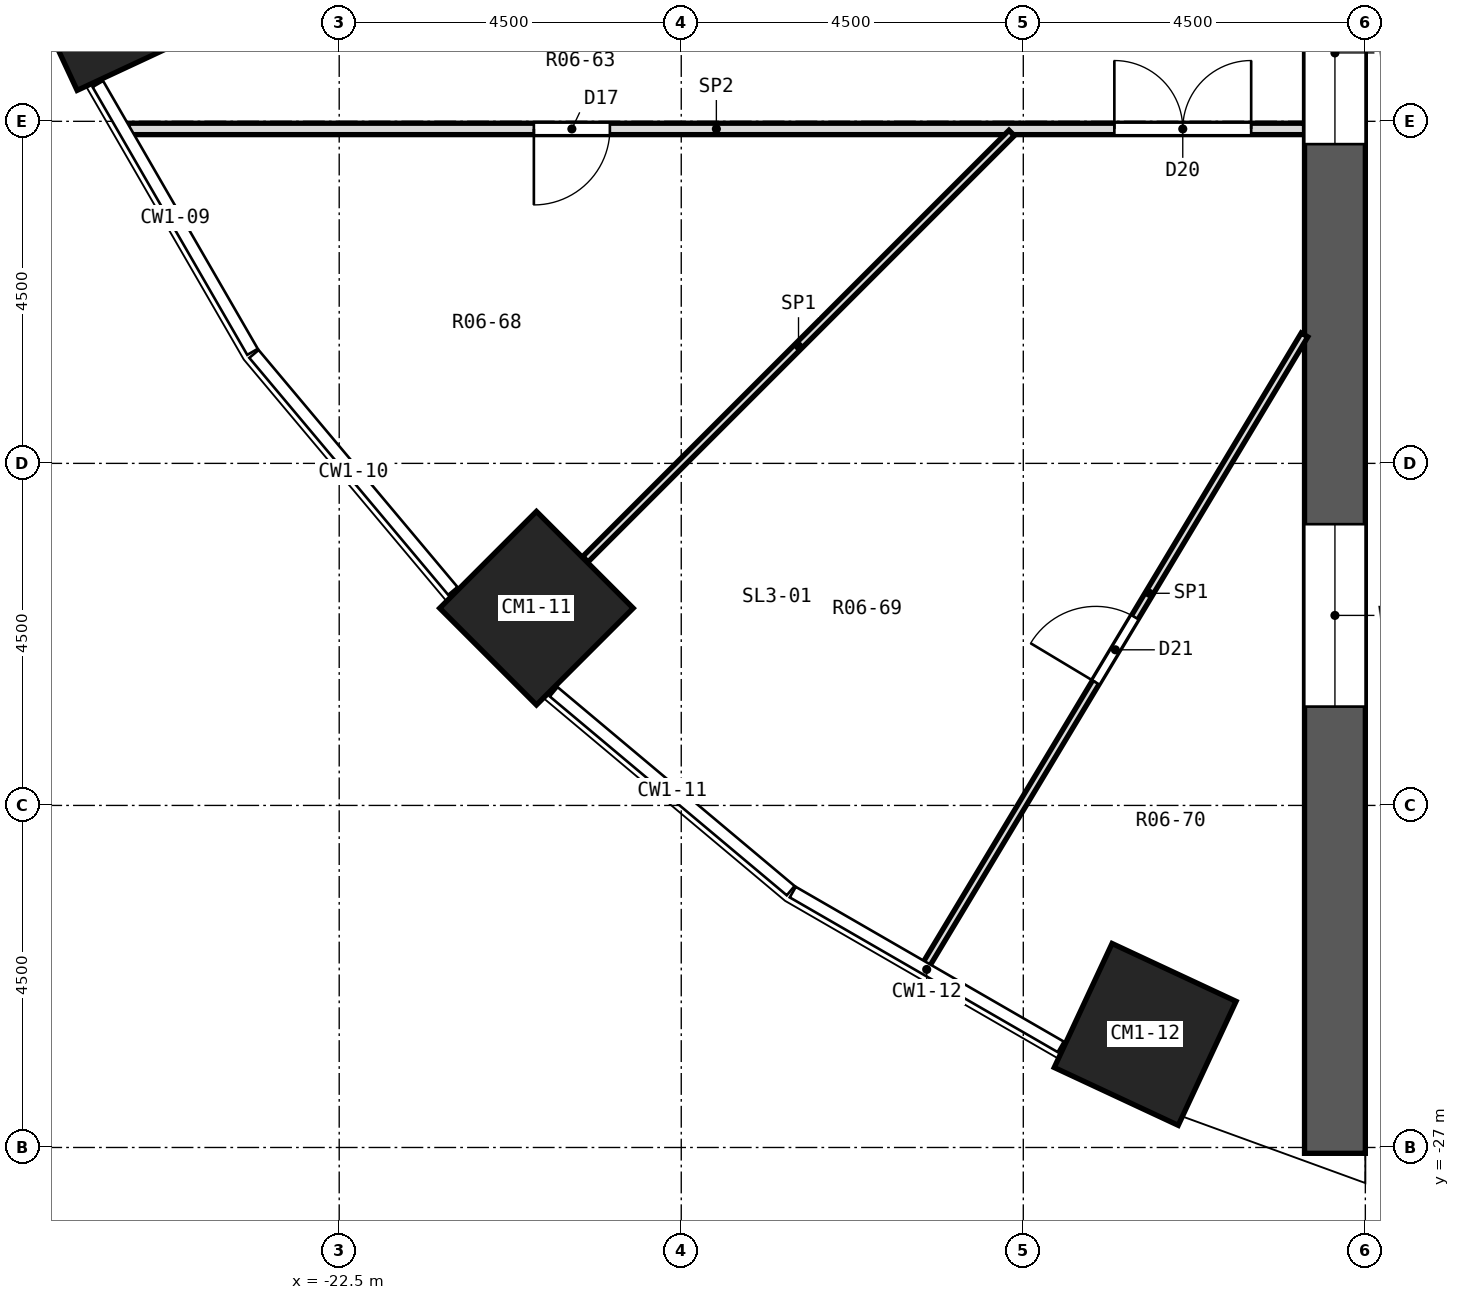
"""IFC4 building model, lengths in metres.
Left out: names, types, materials, properties, quantities, classifications, styles, units other than length and angle.
Written with IfcOpenShell. Run it as: python <this file> out.ifc"""

import sys

from ifc_helpers import new_model, si_unit, direction, frame, frame_2d, origin, origin_2d, place, context, subcontext, project, spatial, polyline, rectangle, outline, extrude, element, fill, save


model = new_model("IFC4")
c1 = context("Model", 3, precision=1e-05, world=origin(), true_north=direction((0.0, 1.0)))
c2 = subcontext(c1, "Body", "Model", "MODEL_VIEW")
j1 = project(units=[si_unit("LENGTHUNIT", "METRE"), si_unit("PLANEANGLEUNIT", "RADIAN")], contexts=[c1])
p1 = place(None, origin())
s1 = spatial("IfcSite", under=j1, at=p1, CompositionType="ELEMENT")
p2 = place(p1, origin())
s2 = spatial("IfcBuilding", under=s1, at=p2, CompositionType="ELEMENT")
p3 = place(p2, frame((0.0, 0.0, 13.4)))
s3 = spatial("IfcBuildingStorey", under=s2, at=p3, CompositionType="ELEMENT", Elevation=13.4)
for number, where, z_axis, x_axis in (
    (1, (-25.512, -11.897, 0.0), (0.0, 0.0, 1.0), (-0.906, -0.423, 0.0)),
    (2, (-19.905, -19.905, 0.0), (0.0, 0.0, 1.0), (-0.707, -0.707, 0.0)),
    (3, (-11.897, -25.512, 0.0), (0.0, 0.0, 1.0), (-0.423, -0.906, 0.0)),
):
    element("IfcColumn", number, at=place(p3, frame(where, z_axis=z_axis, x_axis=x_axis)), inside=s3, PredefinedType="COLUMN", context=c2, shape_type="SweptSolid", body=[
        extrude(rectangle(XDim=1.8, YDim=1.8, at=origin_2d()), origin(), (0.0, 0.0, 1.0), 4.2),
    ])
p4 = place(p3, frame((-9.4, -27.077, 0.0), z_axis=(0.0, 0.0, 1.0), x_axis=(0.0, 1.0, 0.0)))
e4 = element("IfcWall", 4, at=p4, inside=s3, PredefinedType="SHEAR", context=c2, shape_type="SweptSolid", body=[
    extrude(rectangle(XDim=54.154, YDim=0.8, at=frame_2d((27.077, 0.0))), origin(), (0.0, 0.0, 1.0), 4.2),
])
p5 = place(p4, frame((13.277, 0.0, 0.9)))
e5 = element("IfcOpeningElement", 5, at=p5, cuts=e4, PredefinedType="OPENING", context=c2, shape_type="SweptSolid", body=[
    extrude(rectangle(XDim=2.4, YDim=2.1, at=frame_2d((1.2, 1.05))), frame((0.0, 0.412, 0.0), z_axis=(0.0, -1.0, 0.0), x_axis=(1.0, 0.0, 0.0)), (0.0, 0.0, 1.0), 0.824),
])
p6 = place(p4, frame((17.877, 0.0, 0.9)))
e6 = element("IfcOpeningElement", 6, at=p6, cuts=e4, PredefinedType="OPENING", context=c2, shape_type="SweptSolid", body=[
    extrude(rectangle(XDim=2.4, YDim=2.1, at=frame_2d((1.2, 1.05))), frame((0.0, 0.412, 0.0), z_axis=(0.0, -1.0, 0.0), x_axis=(1.0, 0.0, 0.0)), (0.0, 0.0, 1.0), 0.824),
])
p7 = place(p4, frame((22.477, 0.0, 0.9)))
e7 = element("IfcOpeningElement", 7, at=p7, cuts=e4, PredefinedType="OPENING", context=c2, shape_type="SweptSolid", body=[
    extrude(rectangle(XDim=2.4, YDim=2.1, at=frame_2d((1.2, 1.05))), frame((0.0, 0.412, 0.0), z_axis=(0.0, -1.0, 0.0), x_axis=(1.0, 0.0, 0.0)), (0.0, 0.0, 1.0), 0.824),
])
p8 = place(p4, frame((29.277, 0.0, 0.9)))
e8 = element("IfcOpeningElement", 8, at=p8, cuts=e4, PredefinedType="OPENING", context=c2, shape_type="SweptSolid", body=[
    extrude(rectangle(XDim=2.4, YDim=2.1, at=frame_2d((1.2, 1.05))), frame((0.0, 0.412, 0.0), z_axis=(0.0, -1.0, 0.0), x_axis=(1.0, 0.0, 0.0)), (0.0, 0.0, 1.0), 0.824),
])
p9 = place(p4, frame((33.877, 0.0, 0.9)))
e9 = element("IfcOpeningElement", 9, at=p9, cuts=e4, PredefinedType="OPENING", context=c2, shape_type="SweptSolid", body=[
    extrude(rectangle(XDim=2.4, YDim=2.1, at=frame_2d((1.2, 1.05))), frame((0.0, 0.412, 0.0), z_axis=(0.0, -1.0, 0.0), x_axis=(1.0, 0.0, 0.0)), (0.0, 0.0, 1.0), 0.824),
])
p10 = place(p4, frame((38.477, 0.0, 0.9)))
e10 = element("IfcOpeningElement", 10, at=p10, cuts=e4, PredefinedType="OPENING", context=c2, shape_type="SweptSolid", body=[
    extrude(rectangle(XDim=2.4, YDim=2.1, at=frame_2d((1.2, 1.05))), frame((0.0, 0.412, 0.0), z_axis=(0.0, -1.0, 0.0), x_axis=(1.0, 0.0, 0.0)), (0.0, 0.0, 1.0), 0.824),
])
p11 = place(p4, frame((5.877, 0.0, 0.9)))
e11 = element("IfcOpeningElement", 11, at=p11, cuts=e4, PredefinedType="OPENING", context=c2, shape_type="SweptSolid", body=[
    extrude(rectangle(XDim=2.4, YDim=2.1, at=frame_2d((1.2, 1.05))), frame((0.0, 0.412, 0.0), z_axis=(0.0, -1.0, 0.0), x_axis=(1.0, 0.0, 0.0)), (0.0, 0.0, 1.0), 0.824),
])
p12 = place(p4, frame((45.877, 0.0, 0.9)))
e12 = element("IfcOpeningElement", 12, at=p12, cuts=e4, PredefinedType="OPENING", context=c2, shape_type="SweptSolid", body=[
    extrude(rectangle(XDim=2.4, YDim=2.1, at=frame_2d((1.2, 1.05))), frame((0.0, 0.412, 0.0), z_axis=(0.0, -1.0, 0.0), x_axis=(1.0, 0.0, 0.0)), (0.0, 0.0, 1.0), 0.824),
])
p13 = place(p3, frame((-8.991, -27.443, 0.0), z_axis=(-0.342026905008, -0.939688050207, 0.001991117406), x_axis=(-0.93968991291, 0.342027583063, 3.2668e-08)))
e13 = element("IfcWall", 13, at=p13, inside=s3, PredefinedType="SOLIDWALL", context=c2, shape_type="SweptSolid", body=[
    extrude(outline(polyline([(0.0, 0.0), (2.81, -2.168e-19), (2.81, -3.65), (4.403e-05, -3.65), (0.0, -4.2), (-0.935, -4.2), (-0.935, -3.65), (-0.935, -0.523), (-0.657, -8.514e-08), (0.0, 0.0)])), origin(), (0.0, 0.0, -1.0), 0.38),
])
p14 = place(p3, frame((-25.276, -13.6, 0.0), z_axis=(0.0, 0.0, 1.0), x_axis=(1.0, 0.0, 0.0)))
e14 = element("IfcWall", 14, at=p14, inside=s3, PredefinedType="PARTITIONING", context=c2, shape_type="SweptSolid", body=[
    extrude(rectangle(XDim=15.476, YDim=0.15, at=frame_2d((7.738, 0.0))), origin(), (0.0, 0.0, 1.0), 3.65),
])
p15 = place(p14, frame((5.337, 0.0, 0.0)))
e15 = element("IfcOpeningElement", 15, at=p15, cuts=e14, PredefinedType="OPENING", context=c2, shape_type="SweptSolid", body=[
    extrude(rectangle(XDim=1.0, YDim=2.1, at=frame_2d((0.5, 1.05))), frame((0.0, 0.087, 0.0), z_axis=(0.0, -1.0, 0.0), x_axis=(1.0, 0.0, 0.0)), (0.0, 0.0, 1.0), 0.174),
])
p16 = place(p14, frame((12.974, 0.0, 0.0)))
e16 = element("IfcOpeningElement", 16, at=p16, cuts=e14, PredefinedType="OPENING", context=c2, shape_type="SweptSolid", body=[
    extrude(rectangle(XDim=1.8, YDim=2.1, at=frame_2d((0.9, 1.05))), frame((0.0, 0.087, 0.0), z_axis=(0.0, -1.0, 0.0), x_axis=(1.0, 0.0, 0.0)), (0.0, 0.0, 1.0), 0.174),
])
p17 = place(p3, frame((-19.262, -19.262, 0.0), z_axis=(0.0, 0.0, 1.0), x_axis=(0.707106781187, 0.707106781187, 0.0)))
e17 = element("IfcWall", 17, at=p17, inside=s3, PredefinedType="PARTITIONING", context=c2, shape_type="SweptSolid", body=[
    extrude(rectangle(XDim=7.932, YDim=0.1, at=frame_2d((3.966, 0.0))), origin(), (0.0, 0.0, 1.0), 3.65),
])
p18 = place(p3, frame((-14.778, -24.595, 0.0), z_axis=(0.0, 0.0, 1.0), x_axis=(0.515034268369, 0.857169587891, 0.0)))
e18 = element("IfcWall", 18, at=p18, inside=s3, PredefinedType="PARTITIONING", context=c2, shape_type="SweptSolid", body=[
    extrude(rectangle(XDim=9.666, YDim=0.1, at=frame_2d((4.833, 0.0))), origin(), (0.0, 0.0, 1.0), 3.65),
])
p19 = place(p18, frame((4.333, 0.0, 0.0)))
e19 = element("IfcOpeningElement", 19, at=p19, cuts=e18, PredefinedType="OPENING", context=c2, shape_type="SweptSolid", body=[
    extrude(rectangle(XDim=1.0, YDim=2.1, at=frame_2d((0.5, 1.05))), frame((0.0, 0.062, 0.0), z_axis=(0.0, -1.0, 0.0), x_axis=(1.0, 0.0, 0.0)), (0.0, 0.0, 1.0), 0.124),
])
p20 = place(p15, frame((1.0, 0.0, 0.0), z_axis=(0.0, 0.0, 1.0), x_axis=(-1.0, 0.0, 0.0)))
e20 = element("IfcDoor", 20, at=p20, inside=s3, OperationType="SINGLE_SWING_RIGHT", PredefinedType="DOOR", context=c2, shape_type="SweptSolid", body=[
    extrude(rectangle(XDim=1.0, YDim=2.1, at=frame_2d((0.5, 1.05))), frame((0.0, 0.025, 0.0), z_axis=(0.0, -1.0, 0.0), x_axis=(1.0, 0.0, 0.0)), (0.0, 0.0, 1.0), 0.05),
])
fill(e15, e20)
p21 = place(p16, origin())
e21 = element("IfcDoor", 21, at=p21, inside=s3, OperationType="DOUBLE_DOOR_SINGLE_SWING", PredefinedType="DOOR", context=c2, shape_type="SweptSolid", body=[
    extrude(rectangle(XDim=1.8, YDim=2.1, at=frame_2d((0.9, 1.05))), frame((0.0, 0.025, 0.0), z_axis=(0.0, -1.0, 0.0), x_axis=(1.0, 0.0, 0.0)), (0.0, 0.0, 1.0), 0.05),
])
fill(e16, e21)
p22 = place(p19, origin())
e22 = element("IfcDoor", 22, at=p22, inside=s3, OperationType="SINGLE_SWING_LEFT", PredefinedType="DOOR", context=c2, shape_type="SweptSolid", body=[
    extrude(rectangle(XDim=1.0, YDim=2.1, at=frame_2d((0.5, 1.05))), frame((0.0, 0.025, 0.0), z_axis=(0.0, -1.0, 0.0), x_axis=(1.0, 0.0, 0.0)), (0.0, 0.0, 1.0), 0.05),
])
fill(e19, e22)
p23 = place(p5, origin())
e23 = element("IfcWindow", 23, at=p23, inside=s3, PartitioningType="SINGLE_PANEL", PredefinedType="WINDOW", context=c2, shape_type="SweptSolid", body=[
    extrude(rectangle(XDim=2.4, YDim=2.1, at=frame_2d((1.2, 1.05))), frame((0.0, 0.03, 0.0), z_axis=(0.0, -1.0, 0.0), x_axis=(1.0, 0.0, 0.0)), (0.0, 0.0, 1.0), 0.06),
])
fill(e5, e23)
p24 = place(p11, origin())
e24 = element("IfcWindow", 24, at=p24, inside=s3, PartitioningType="SINGLE_PANEL", PredefinedType="WINDOW", context=c2, shape_type="SweptSolid", body=[
    extrude(rectangle(XDim=2.4, YDim=2.1, at=frame_2d((1.2, 1.05))), frame((0.0, 0.03, 0.0), z_axis=(0.0, -1.0, 0.0), x_axis=(1.0, 0.0, 0.0)), (0.0, 0.0, 1.0), 0.06),
])
fill(e11, e24)
save(model, sys.argv[1])
